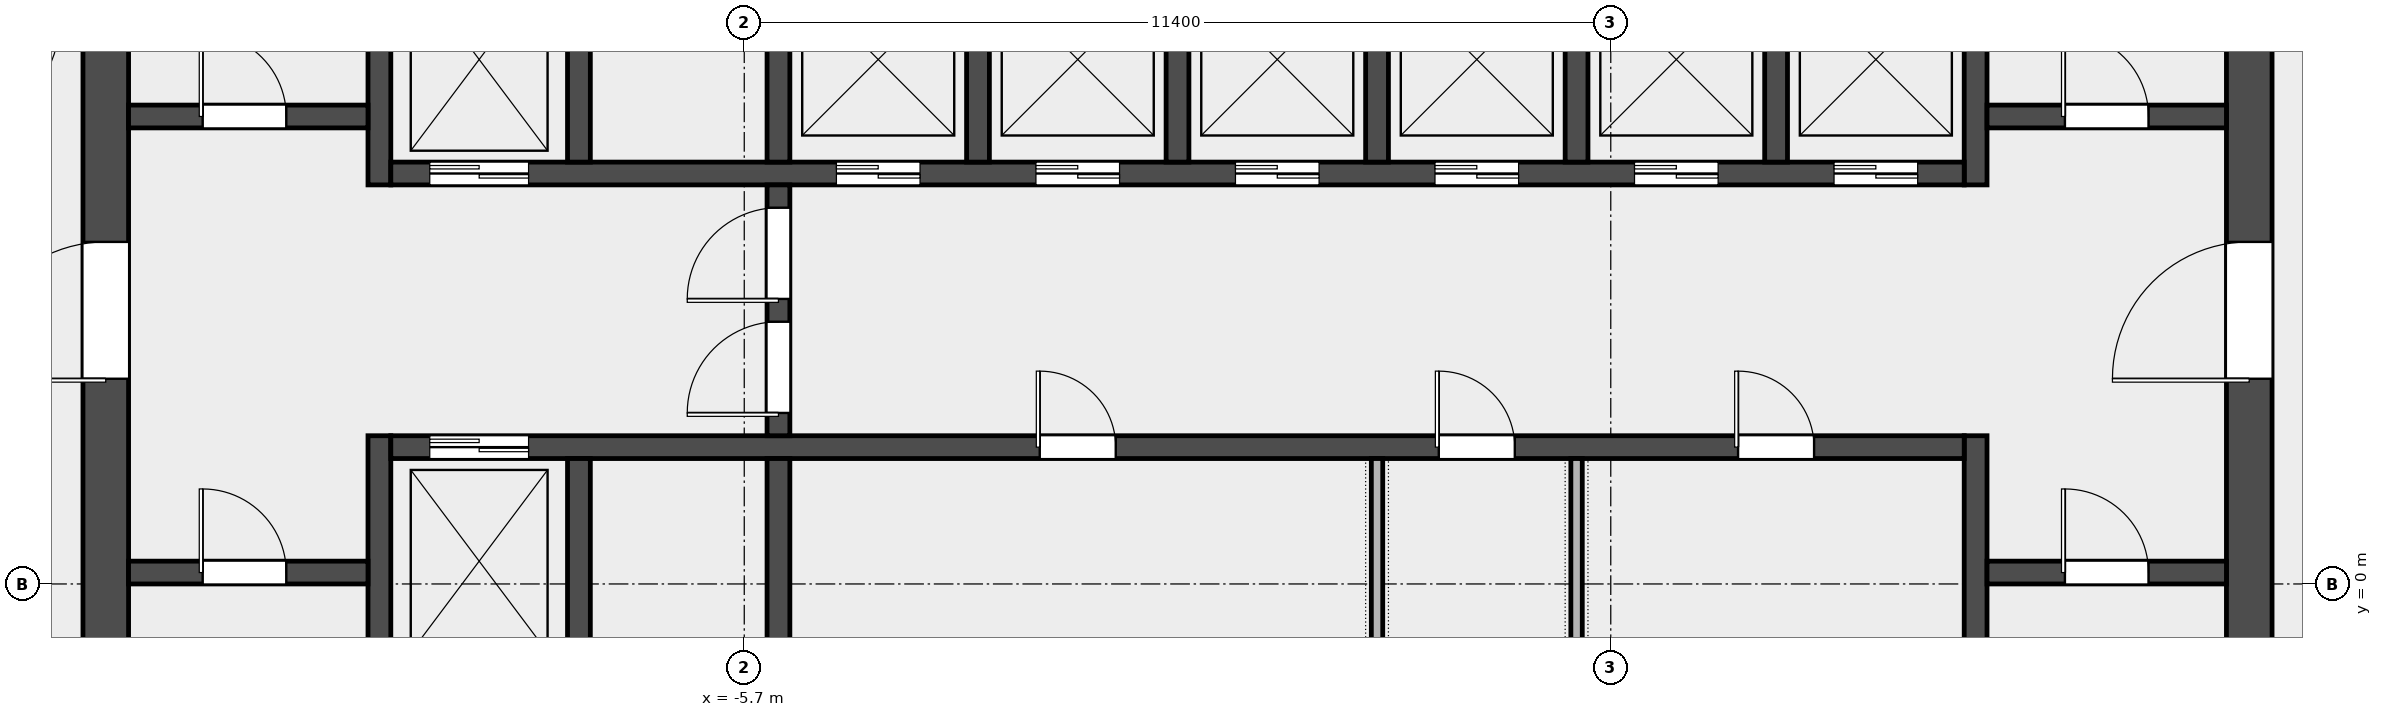
"""IFC4 building model, lengths in metres.
Left out: names, types, materials, properties, quantities, classifications, styles, units other than length and angle.
Written with IfcOpenShell. Run it as: python <this file> out.ifc"""

import sys

from ifc_helpers import new_model, si_unit, direction, frame, frame_2d, origin, place, context, subcontext, project, spatial, rectangle, extrude, element, fill, save


model = new_model("IFC4")
c1 = context("Model", 3, precision=1e-05, world=origin(), true_north=direction((0.0, 1.0)))
c2 = subcontext(c1, "Body", "Model", "MODEL_VIEW")
j1 = project(units=[si_unit("LENGTHUNIT", "METRE"), si_unit("PLANEANGLEUNIT", "RADIAN")], contexts=[c1])
p1 = place(None, origin())
s1 = spatial("IfcSite", under=j1, at=p1, CompositionType="ELEMENT")
p2 = place(p1, origin())
s2 = spatial("IfcBuilding", under=s1, at=p2, CompositionType="ELEMENT")
p3 = place(p2, frame((0.0, 0.0, 247.0)))
s3 = spatial("IfcBuildingStorey", under=s2, at=p3, CompositionType="ELEMENT", Elevation=247.0)
p4 = place(p3, frame((-14.1, -6.6, 0.0), z_axis=(0.0, 0.0, 1.0), x_axis=(0.0, 1.0, 0.0)))
e1 = element("IfcWall", 1, at=p4, inside=s3, PredefinedType="SHEAR", context=c2, shape_type="SweptSolid", body=[
    extrude(rectangle(XDim=19.5, YDim=0.6, at=frame_2d((9.75, 0.0))), origin(), (0.0, 0.0, 1.0), 3.7),
])
p5 = place(p4, frame((9.3, 0.0, 0.0)))
e2 = element("IfcOpeningElement", 2, at=p5, cuts=e1, PredefinedType="OPENING", context=c2, shape_type="SweptSolid", body=[
    extrude(rectangle(XDim=1.8, YDim=2.1, at=frame_2d((0.9, 1.05))), frame((0.0, 0.312, 0.0), z_axis=(0.0, -1.0, 0.0), x_axis=(1.0, 0.0, 0.0)), (0.0, 0.0, 1.0), 0.624),
])
p6 = place(p3, frame((14.1, -6.6, 0.0), z_axis=(0.0, 0.0, 1.0), x_axis=(0.0, 1.0, 0.0)))
e3 = element("IfcWall", 3, at=p6, inside=s3, PredefinedType="SHEAR", context=c2, shape_type="SweptSolid", body=[
    extrude(rectangle(XDim=19.5, YDim=0.6, at=frame_2d((9.75, 0.0))), origin(), (0.0, 0.0, 1.0), 3.7),
])
p7 = place(p6, frame((9.3, 0.0, 0.0)))
e4 = element("IfcOpeningElement", 4, at=p7, cuts=e3, PredefinedType="OPENING", context=c2, shape_type="SweptSolid", body=[
    extrude(rectangle(XDim=1.8, YDim=2.1, at=frame_2d((0.9, 1.05))), frame((0.0, 0.312, 0.0), z_axis=(0.0, -1.0, 0.0), x_axis=(1.0, 0.0, 0.0)), (0.0, 0.0, 1.0), 0.624),
])
p8 = place(p3, frame((-10.5, -6.6, 0.0), z_axis=(0.0, 0.0, 1.0), x_axis=(0.0, 1.0, 0.0)))
e5 = element("IfcWall", 5, at=p8, inside=s3, PredefinedType="SHEAR", context=c2, shape_type="SweptSolid", body=[
    extrude(rectangle(XDim=8.55, YDim=0.3, at=frame_2d((4.275, 0.0))), origin(), (0.0, 0.0, 1.0), 3.7),
])
p9 = place(p3, frame((-10.5, 5.25, 0.0), z_axis=(0.0, 0.0, 1.0), x_axis=(0.0, 1.0, 0.0)))
e6 = element("IfcWall", 6, at=p9, inside=s3, PredefinedType="SHEAR", context=c2, shape_type="SweptSolid", body=[
    extrude(rectangle(XDim=7.65, YDim=0.3, at=frame_2d((3.825, 0.0))), origin(), (0.0, 0.0, 1.0), 3.7),
])
p10 = place(p3, frame((10.5, -6.6, 0.0), z_axis=(0.0, 0.0, 1.0), x_axis=(0.0, 1.0, 0.0)))
e7 = element("IfcWall", 7, at=p10, inside=s3, PredefinedType="SHEAR", context=c2, shape_type="SweptSolid", body=[
    extrude(rectangle(XDim=8.55, YDim=0.3, at=frame_2d((4.275, 0.0))), origin(), (0.0, 0.0, 1.0), 3.7),
])
p11 = place(p3, frame((10.5, 5.25, 0.0), z_axis=(0.0, 0.0, 1.0), x_axis=(0.0, 1.0, 0.0)))
e8 = element("IfcWall", 8, at=p11, inside=s3, PredefinedType="SHEAR", context=c2, shape_type="SweptSolid", body=[
    extrude(rectangle(XDim=7.65, YDim=0.3, at=frame_2d((3.825, 0.0))), origin(), (0.0, 0.0, 1.0), 3.7),
])
p12 = place(p3, frame((-13.8, 0.15, 0.0), z_axis=(0.0, 0.0, 1.0), x_axis=(1.0, 0.0, 0.0)))
e9 = element("IfcWall", 9, at=p12, inside=s3, PredefinedType="SOLIDWALL", context=c2, shape_type="SweptSolid", body=[
    extrude(rectangle(XDim=3.15, YDim=0.3, at=frame_2d((1.575, 0.0))), origin(), (0.0, 0.0, 1.0), 3.7),
])
p13 = place(p12, frame((0.975, 0.0, 0.0)))
e10 = element("IfcOpeningElement", 10, at=p13, cuts=e9, PredefinedType="OPENING", context=c2, shape_type="SweptSolid", body=[
    extrude(rectangle(XDim=1.1, YDim=2.1, at=frame_2d((0.55, 1.05))), frame((0.0, 0.162, 0.0), z_axis=(0.0, -1.0, 0.0), x_axis=(1.0, 0.0, 0.0)), (0.0, 0.0, 1.0), 0.324),
])
p14 = place(p3, frame((-13.8, 6.15, 0.0), z_axis=(0.0, 0.0, 1.0), x_axis=(1.0, 0.0, 0.0)))
e11 = element("IfcWall", 11, at=p14, inside=s3, PredefinedType="SOLIDWALL", context=c2, shape_type="SweptSolid", body=[
    extrude(rectangle(XDim=3.15, YDim=0.3, at=frame_2d((1.575, 0.0))), origin(), (0.0, 0.0, 1.0), 3.7),
])
p15 = place(p14, frame((0.975, 0.0, 0.0)))
e12 = element("IfcOpeningElement", 12, at=p15, cuts=e11, PredefinedType="OPENING", context=c2, shape_type="SweptSolid", body=[
    extrude(rectangle(XDim=1.1, YDim=2.1, at=frame_2d((0.55, 1.05))), frame((0.0, 0.162, 0.0), z_axis=(0.0, -1.0, 0.0), x_axis=(1.0, 0.0, 0.0)), (0.0, 0.0, 1.0), 0.324),
])
p16 = place(p3, frame((10.65, 0.15, 0.0), z_axis=(0.0, 0.0, 1.0), x_axis=(1.0, 0.0, 0.0)))
e13 = element("IfcWall", 13, at=p16, inside=s3, PredefinedType="SOLIDWALL", context=c2, shape_type="SweptSolid", body=[
    extrude(rectangle(XDim=3.15, YDim=0.3, at=frame_2d((1.575, 0.0))), origin(), (0.0, 0.0, 1.0), 3.7),
])
p17 = place(p16, frame((1.025, 0.0, 0.0)))
e14 = element("IfcOpeningElement", 14, at=p17, cuts=e13, PredefinedType="OPENING", context=c2, shape_type="SweptSolid", body=[
    extrude(rectangle(XDim=1.1, YDim=2.1, at=frame_2d((0.55, 1.05))), frame((0.0, 0.162, 0.0), z_axis=(0.0, -1.0, 0.0), x_axis=(1.0, 0.0, 0.0)), (0.0, 0.0, 1.0), 0.324),
])
p18 = place(p3, frame((10.65, 6.15, 0.0), z_axis=(0.0, 0.0, 1.0), x_axis=(1.0, 0.0, 0.0)))
e15 = element("IfcWall", 15, at=p18, inside=s3, PredefinedType="SOLIDWALL", context=c2, shape_type="SweptSolid", body=[
    extrude(rectangle(XDim=3.15, YDim=0.3, at=frame_2d((1.575, 0.0))), origin(), (0.0, 0.0, 1.0), 3.7),
])
p19 = place(p18, frame((1.025, 0.0, 0.0)))
e16 = element("IfcOpeningElement", 16, at=p19, cuts=e15, PredefinedType="OPENING", context=c2, shape_type="SweptSolid", body=[
    extrude(rectangle(XDim=1.1, YDim=2.1, at=frame_2d((0.55, 1.05))), frame((0.0, 0.162, 0.0), z_axis=(0.0, -1.0, 0.0), x_axis=(1.0, 0.0, 0.0)), (0.0, 0.0, 1.0), 0.324),
])
p20 = place(p3, frame((-10.35, 1.8, 0.0), z_axis=(0.0, 0.0, 1.0), x_axis=(1.0, 0.0, 0.0)))
e17 = element("IfcWall", 17, at=p20, inside=s3, PredefinedType="SOLIDWALL", context=c2, shape_type="SweptSolid", body=[
    extrude(rectangle(XDim=20.7, YDim=0.3, at=frame_2d((10.35, 0.0))), origin(), (0.0, 0.0, 1.0), 3.7),
])
p21 = place(p20, frame((0.512, 0.0, 0.0)))
e18 = element("IfcOpeningElement", 18, at=p21, cuts=e17, PredefinedType="OPENING", context=c2, shape_type="SweptSolid", body=[
    extrude(rectangle(XDim=1.3, YDim=2.1, at=frame_2d((0.65, 1.05))), frame((0.0, 0.162, 0.0), z_axis=(0.0, -1.0, 0.0), x_axis=(1.0, 0.0, 0.0)), (0.0, 0.0, 1.0), 0.324),
])
p22 = place(p20, frame((8.538, 0.0, 0.0)))
e19 = element("IfcOpeningElement", 19, at=p22, cuts=e17, PredefinedType="OPENING", context=c2, shape_type="SweptSolid", body=[
    extrude(rectangle(XDim=1.0, YDim=2.1, at=frame_2d((0.5, 1.05))), frame((0.0, 0.162, 0.0), z_axis=(0.0, -1.0, 0.0), x_axis=(1.0, 0.0, 0.0)), (0.0, 0.0, 1.0), 0.324),
])
p23 = place(p20, frame((13.788, 0.0, 0.0)))
e20 = element("IfcOpeningElement", 20, at=p23, cuts=e17, PredefinedType="OPENING", context=c2, shape_type="SweptSolid", body=[
    extrude(rectangle(XDim=1.0, YDim=2.1, at=frame_2d((0.5, 1.05))), frame((0.0, 0.162, 0.0), z_axis=(0.0, -1.0, 0.0), x_axis=(1.0, 0.0, 0.0)), (0.0, 0.0, 1.0), 0.324),
])
p24 = place(p20, frame((17.725, 0.0, 0.0)))
e21 = element("IfcOpeningElement", 21, at=p24, cuts=e17, PredefinedType="OPENING", context=c2, shape_type="SweptSolid", body=[
    extrude(rectangle(XDim=1.0, YDim=2.1, at=frame_2d((0.5, 1.05))), frame((0.0, 0.162, 0.0), z_axis=(0.0, -1.0, 0.0), x_axis=(1.0, 0.0, 0.0)), (0.0, 0.0, 1.0), 0.324),
])
p25 = place(p3, frame((-10.35, 5.4, 0.0), z_axis=(0.0, 0.0, 1.0), x_axis=(1.0, 0.0, 0.0)))
e22 = element("IfcWall", 22, at=p25, inside=s3, PredefinedType="SOLIDWALL", context=c2, shape_type="SweptSolid", body=[
    extrude(rectangle(XDim=20.7, YDim=0.3, at=frame_2d((10.35, 0.0))), origin(), (0.0, 0.0, 1.0), 3.7),
])
p26 = place(p25, frame((0.512, 0.0, 0.0)))
e23 = element("IfcOpeningElement", 23, at=p26, cuts=e22, PredefinedType="OPENING", context=c2, shape_type="SweptSolid", body=[
    extrude(rectangle(XDim=1.3, YDim=2.1, at=frame_2d((0.65, 1.05))), frame((0.0, 0.162, 0.0), z_axis=(0.0, -1.0, 0.0), x_axis=(1.0, 0.0, 0.0)), (0.0, 0.0, 1.0), 0.324),
])
p27 = place(p25, frame((5.863, 0.0, 0.0)))
e24 = element("IfcOpeningElement", 24, at=p27, cuts=e22, PredefinedType="OPENING", context=c2, shape_type="SweptSolid", body=[
    extrude(rectangle(XDim=1.1, YDim=2.1, at=frame_2d((0.55, 1.05))), frame((0.0, 0.162, 0.0), z_axis=(0.0, -1.0, 0.0), x_axis=(1.0, 0.0, 0.0)), (0.0, 0.0, 1.0), 0.324),
])
p28 = place(p25, frame((8.488, 0.0, 0.0)))
e25 = element("IfcOpeningElement", 25, at=p28, cuts=e22, PredefinedType="OPENING", context=c2, shape_type="SweptSolid", body=[
    extrude(rectangle(XDim=1.1, YDim=2.1, at=frame_2d((0.55, 1.05))), frame((0.0, 0.162, 0.0), z_axis=(0.0, -1.0, 0.0), x_axis=(1.0, 0.0, 0.0)), (0.0, 0.0, 1.0), 0.324),
])
p29 = place(p25, frame((11.113, 0.0, 0.0)))
e26 = element("IfcOpeningElement", 26, at=p29, cuts=e22, PredefinedType="OPENING", context=c2, shape_type="SweptSolid", body=[
    extrude(rectangle(XDim=1.1, YDim=2.1, at=frame_2d((0.55, 1.05))), frame((0.0, 0.162, 0.0), z_axis=(0.0, -1.0, 0.0), x_axis=(1.0, 0.0, 0.0)), (0.0, 0.0, 1.0), 0.324),
])
p30 = place(p25, frame((13.738, 0.0, 0.0)))
e27 = element("IfcOpeningElement", 27, at=p30, cuts=e22, PredefinedType="OPENING", context=c2, shape_type="SweptSolid", body=[
    extrude(rectangle(XDim=1.1, YDim=2.1, at=frame_2d((0.55, 1.05))), frame((0.0, 0.162, 0.0), z_axis=(0.0, -1.0, 0.0), x_axis=(1.0, 0.0, 0.0)), (0.0, 0.0, 1.0), 0.324),
])
p31 = place(p25, frame((16.363, 0.0, 0.0)))
e28 = element("IfcOpeningElement", 28, at=p31, cuts=e22, PredefinedType="OPENING", context=c2, shape_type="SweptSolid", body=[
    extrude(rectangle(XDim=1.1, YDim=2.1, at=frame_2d((0.55, 1.05))), frame((0.0, 0.162, 0.0), z_axis=(0.0, -1.0, 0.0), x_axis=(1.0, 0.0, 0.0)), (0.0, 0.0, 1.0), 0.324),
])
p32 = place(p25, frame((18.988, 0.0, 0.0)))
e29 = element("IfcOpeningElement", 29, at=p32, cuts=e22, PredefinedType="OPENING", context=c2, shape_type="SweptSolid", body=[
    extrude(rectangle(XDim=1.1, YDim=2.1, at=frame_2d((0.55, 1.05))), frame((0.0, 0.162, 0.0), z_axis=(0.0, -1.0, 0.0), x_axis=(1.0, 0.0, 0.0)), (0.0, 0.0, 1.0), 0.324),
])
for number, where, z_axis, x_axis in (
    (30, (-7.875, -1.05, 0.0), (0.0, 0.0, 1.0), (0.0, 1.0, 0.0)),
    (31, (-5.25, -1.05, 0.0), (0.0, 0.0, 1.0), (0.0, 1.0, 0.0)),
    (32, (-7.875, 5.55, 0.0), (0.0, 0.0, 1.0), (0.0, 1.0, 0.0)),
    (33, (-5.25, 5.55, 0.0), (0.0, 0.0, 1.0), (0.0, 1.0, 0.0)),
    (34, (-2.625, 5.55, 0.0), (0.0, 0.0, 1.0), (0.0, 1.0, 0.0)),
    (35, (0.0, 5.55, 0.0), (0.0, 0.0, 1.0), (0.0, 1.0, 0.0)),
    (36, (2.625, 5.55, 0.0), (0.0, 0.0, 1.0), (0.0, 1.0, 0.0)),
    (37, (5.25, 5.55, 0.0), (0.0, 0.0, 1.0), (0.0, 1.0, 0.0)),
    (38, (7.875, 5.55, 0.0), (0.0, 0.0, 1.0), (0.0, 1.0, 0.0)),
):
    element("IfcWall", number, at=place(p3, frame(where, z_axis=z_axis, x_axis=x_axis)), inside=s3, PredefinedType="SOLIDWALL", context=c2, shape_type="SweptSolid", body=[
        extrude(rectangle(XDim=2.7, YDim=0.3, at=frame_2d((1.35, 0.0))), origin(), (0.0, 0.0, 1.0), 3.7),
    ])
p33 = place(p3, frame((-5.25, 1.95, 0.0), z_axis=(0.0, 0.0, 1.0), x_axis=(0.0, 1.0, 0.0)))
e39 = element("IfcWall", 39, at=p33, inside=s3, PredefinedType="SOLIDWALL", context=c2, shape_type="SweptSolid", body=[
    extrude(rectangle(XDim=3.3, YDim=0.3, at=frame_2d((1.65, 0.0))), origin(), (0.0, 0.0, 1.0), 3.7),
])
p34 = place(p33, frame((0.3, 0.0, 0.0)))
e40 = element("IfcOpeningElement", 40, at=p34, cuts=e39, PredefinedType="OPENING", context=c2, shape_type="SweptSolid", body=[
    extrude(rectangle(XDim=1.2, YDim=2.1, at=frame_2d((0.6, 1.05))), frame((0.0, 0.162, 0.0), z_axis=(0.0, -1.0, 0.0), x_axis=(1.0, 0.0, 0.0)), (0.0, 0.0, 1.0), 0.324),
])
p35 = place(p33, frame((1.8, 0.0, 0.0)))
e41 = element("IfcOpeningElement", 41, at=p35, cuts=e39, PredefinedType="OPENING", context=c2, shape_type="SweptSolid", body=[
    extrude(rectangle(XDim=1.2, YDim=2.1, at=frame_2d((0.6, 1.05))), frame((0.0, 0.162, 0.0), z_axis=(0.0, -1.0, 0.0), x_axis=(1.0, 0.0, 0.0)), (0.0, 0.0, 1.0), 0.324),
])
for number, where, z_axis, x_axis in (
    (42, (2.625, -1.05, 0.0), (0.0, 0.0, 1.0), (0.0, 1.0, 0.0)),
    (43, (5.25, -1.05, 0.0), (0.0, 0.0, 1.0), (0.0, 1.0, 0.0)),
):
    element("IfcWall", number, at=place(p3, frame(where, z_axis=z_axis, x_axis=x_axis)), inside=s3, PredefinedType="PARTITIONING", context=c2, shape_type="SweptSolid", body=[
        extrude(rectangle(XDim=2.7, YDim=0.15, at=frame_2d((1.35, 0.0))), origin(), (0.0, 0.0, 1.0), 3.7),
    ])
p36 = place(p13, origin())
e44 = element("IfcDoor", 44, at=p36, inside=s3, OperationType="SINGLE_SWING_LEFT", PredefinedType="DOOR", context=c2, shape_type="SweptSolid", body=[
    extrude(rectangle(XDim=1.1, YDim=2.1, at=frame_2d((0.55, 1.05))), frame((0.0, 0.025, 0.0), z_axis=(0.0, -1.0, 0.0), x_axis=(1.0, 0.0, 0.0)), (0.0, 0.0, 1.0), 0.05),
])
fill(e10, e44)
p37 = place(p15, origin())
e45 = element("IfcDoor", 45, at=p37, inside=s3, OperationType="SINGLE_SWING_LEFT", PredefinedType="DOOR", context=c2, shape_type="SweptSolid", body=[
    extrude(rectangle(XDim=1.1, YDim=2.1, at=frame_2d((0.55, 1.05))), frame((0.0, 0.025, 0.0), z_axis=(0.0, -1.0, 0.0), x_axis=(1.0, 0.0, 0.0)), (0.0, 0.0, 1.0), 0.05),
])
fill(e12, e45)
p38 = place(p17, origin())
e46 = element("IfcDoor", 46, at=p38, inside=s3, OperationType="SINGLE_SWING_RIGHT", PredefinedType="DOOR", context=c2, shape_type="SweptSolid", body=[
    extrude(rectangle(XDim=1.1, YDim=2.1, at=frame_2d((0.55, 1.05))), frame((0.0, 0.025, 0.0), z_axis=(0.0, -1.0, 0.0), x_axis=(1.0, 0.0, 0.0)), (0.0, 0.0, 1.0), 0.05),
])
fill(e14, e46)
p39 = place(p19, origin())
e47 = element("IfcDoor", 47, at=p39, inside=s3, OperationType="SINGLE_SWING_RIGHT", PredefinedType="DOOR", context=c2, shape_type="SweptSolid", body=[
    extrude(rectangle(XDim=1.1, YDim=2.1, at=frame_2d((0.55, 1.05))), frame((0.0, 0.025, 0.0), z_axis=(0.0, -1.0, 0.0), x_axis=(1.0, 0.0, 0.0)), (0.0, 0.0, 1.0), 0.05),
])
fill(e16, e47)
p40 = place(p5, origin())
e48 = element("IfcDoor", 48, at=p40, inside=s3, OperationType="DOUBLE_DOOR_SINGLE_SWING", PredefinedType="DOOR", context=c2, shape_type="SweptSolid", body=[
    extrude(rectangle(XDim=1.8, YDim=2.1, at=frame_2d((0.9, 1.05))), frame((0.0, 0.025, 0.0), z_axis=(0.0, -1.0, 0.0), x_axis=(1.0, 0.0, 0.0)), (0.0, 0.0, 1.0), 0.05),
])
fill(e2, e48)
p41 = place(p7, origin())
e49 = element("IfcDoor", 49, at=p41, inside=s3, OperationType="DOUBLE_DOOR_SINGLE_SWING", PredefinedType="DOOR", context=c2, shape_type="SweptSolid", body=[
    extrude(rectangle(XDim=1.8, YDim=2.1, at=frame_2d((0.9, 1.05))), frame((0.0, 0.025, 0.0), z_axis=(0.0, -1.0, 0.0), x_axis=(1.0, 0.0, 0.0)), (0.0, 0.0, 1.0), 0.05),
])
fill(e4, e49)
p42 = place(p34, origin())
e50 = element("IfcDoor", 50, at=p42, inside=s3, OperationType="SINGLE_SWING_LEFT", PredefinedType="DOOR", context=c2, shape_type="SweptSolid", body=[
    extrude(rectangle(XDim=1.2, YDim=2.1, at=frame_2d((0.6, 1.05))), frame((0.0, 0.025, 0.0), z_axis=(0.0, -1.0, 0.0), x_axis=(1.0, 0.0, 0.0)), (0.0, 0.0, 1.0), 0.05),
])
fill(e40, e50)
p43 = place(p35, origin())
e51 = element("IfcDoor", 51, at=p43, inside=s3, OperationType="SINGLE_SWING_RIGHT", PredefinedType="DOOR", context=c2, shape_type="SweptSolid", body=[
    extrude(rectangle(XDim=1.2, YDim=2.1, at=frame_2d((0.6, 1.05))), frame((0.0, 0.025, 0.0), z_axis=(0.0, -1.0, 0.0), x_axis=(1.0, 0.0, 0.0)), (0.0, 0.0, 1.0), 0.05),
])
fill(e41, e51)
p44 = place(p21, origin())
e52 = element("IfcDoor", 52, at=p44, inside=s3, OperationType="DOUBLE_DOOR_SLIDING", PredefinedType="DOOR", context=c2, shape_type="SweptSolid", body=[
    extrude(rectangle(XDim=1.3, YDim=2.1, at=frame_2d((0.65, 1.05))), frame((0.0, 0.025, 0.0), z_axis=(0.0, -1.0, 0.0), x_axis=(1.0, 0.0, 0.0)), (0.0, 0.0, 1.0), 0.05),
])
fill(e18, e52)
p45 = place(p26, origin())
e53 = element("IfcDoor", 53, at=p45, inside=s3, OperationType="DOUBLE_DOOR_SLIDING", PredefinedType="DOOR", context=c2, shape_type="SweptSolid", body=[
    extrude(rectangle(XDim=1.3, YDim=2.1, at=frame_2d((0.65, 1.05))), frame((0.0, 0.025, 0.0), z_axis=(0.0, -1.0, 0.0), x_axis=(1.0, 0.0, 0.0)), (0.0, 0.0, 1.0), 0.05),
])
fill(e23, e53)
p46 = place(p27, origin())
e54 = element("IfcDoor", 54, at=p46, inside=s3, OperationType="DOUBLE_DOOR_SLIDING", PredefinedType="DOOR", context=c2, shape_type="SweptSolid", body=[
    extrude(rectangle(XDim=1.1, YDim=2.1, at=frame_2d((0.55, 1.05))), frame((0.0, 0.025, 0.0), z_axis=(0.0, -1.0, 0.0), x_axis=(1.0, 0.0, 0.0)), (0.0, 0.0, 1.0), 0.05),
])
fill(e24, e54)
p47 = place(p28, origin())
e55 = element("IfcDoor", 55, at=p47, inside=s3, OperationType="DOUBLE_DOOR_SLIDING", PredefinedType="DOOR", context=c2, shape_type="SweptSolid", body=[
    extrude(rectangle(XDim=1.1, YDim=2.1, at=frame_2d((0.55, 1.05))), frame((0.0, 0.025, 0.0), z_axis=(0.0, -1.0, 0.0), x_axis=(1.0, 0.0, 0.0)), (0.0, 0.0, 1.0), 0.05),
])
fill(e25, e55)
p48 = place(p29, origin())
e56 = element("IfcDoor", 56, at=p48, inside=s3, OperationType="DOUBLE_DOOR_SLIDING", PredefinedType="DOOR", context=c2, shape_type="SweptSolid", body=[
    extrude(rectangle(XDim=1.1, YDim=2.1, at=frame_2d((0.55, 1.05))), frame((0.0, 0.025, 0.0), z_axis=(0.0, -1.0, 0.0), x_axis=(1.0, 0.0, 0.0)), (0.0, 0.0, 1.0), 0.05),
])
fill(e26, e56)
p49 = place(p30, origin())
e57 = element("IfcDoor", 57, at=p49, inside=s3, OperationType="DOUBLE_DOOR_SLIDING", PredefinedType="DOOR", context=c2, shape_type="SweptSolid", body=[
    extrude(rectangle(XDim=1.1, YDim=2.1, at=frame_2d((0.55, 1.05))), frame((0.0, 0.025, 0.0), z_axis=(0.0, -1.0, 0.0), x_axis=(1.0, 0.0, 0.0)), (0.0, 0.0, 1.0), 0.05),
])
fill(e27, e57)
p50 = place(p31, origin())
e58 = element("IfcDoor", 58, at=p50, inside=s3, OperationType="DOUBLE_DOOR_SLIDING", PredefinedType="DOOR", context=c2, shape_type="SweptSolid", body=[
    extrude(rectangle(XDim=1.1, YDim=2.1, at=frame_2d((0.55, 1.05))), frame((0.0, 0.025, 0.0), z_axis=(0.0, -1.0, 0.0), x_axis=(1.0, 0.0, 0.0)), (0.0, 0.0, 1.0), 0.05),
])
fill(e28, e58)
p51 = place(p32, origin())
e59 = element("IfcDoor", 59, at=p51, inside=s3, OperationType="DOUBLE_DOOR_SLIDING", PredefinedType="DOOR", context=c2, shape_type="SweptSolid", body=[
    extrude(rectangle(XDim=1.1, YDim=2.1, at=frame_2d((0.55, 1.05))), frame((0.0, 0.025, 0.0), z_axis=(0.0, -1.0, 0.0), x_axis=(1.0, 0.0, 0.0)), (0.0, 0.0, 1.0), 0.05),
])
fill(e29, e59)
p52 = place(p22, origin())
e60 = element("IfcDoor", 60, at=p52, inside=s3, OperationType="SINGLE_SWING_LEFT", PredefinedType="DOOR", context=c2, shape_type="SweptSolid", body=[
    extrude(rectangle(XDim=1.0, YDim=2.1, at=frame_2d((0.5, 1.05))), frame((0.0, 0.025, 0.0), z_axis=(0.0, -1.0, 0.0), x_axis=(1.0, 0.0, 0.0)), (0.0, 0.0, 1.0), 0.05),
])
fill(e19, e60)
p53 = place(p23, origin())
e61 = element("IfcDoor", 61, at=p53, inside=s3, OperationType="SINGLE_SWING_LEFT", PredefinedType="DOOR", context=c2, shape_type="SweptSolid", body=[
    extrude(rectangle(XDim=1.0, YDim=2.1, at=frame_2d((0.5, 1.05))), frame((0.0, 0.025, 0.0), z_axis=(0.0, -1.0, 0.0), x_axis=(1.0, 0.0, 0.0)), (0.0, 0.0, 1.0), 0.05),
])
fill(e20, e61)
p54 = place(p24, origin())
e62 = element("IfcDoor", 62, at=p54, inside=s3, OperationType="SINGLE_SWING_LEFT", PredefinedType="DOOR", context=c2, shape_type="SweptSolid", body=[
    extrude(rectangle(XDim=1.0, YDim=2.1, at=frame_2d((0.5, 1.05))), frame((0.0, 0.025, 0.0), z_axis=(0.0, -1.0, 0.0), x_axis=(1.0, 0.0, 0.0)), (0.0, 0.0, 1.0), 0.05),
])
fill(e21, e62)
save(model, sys.argv[1])
